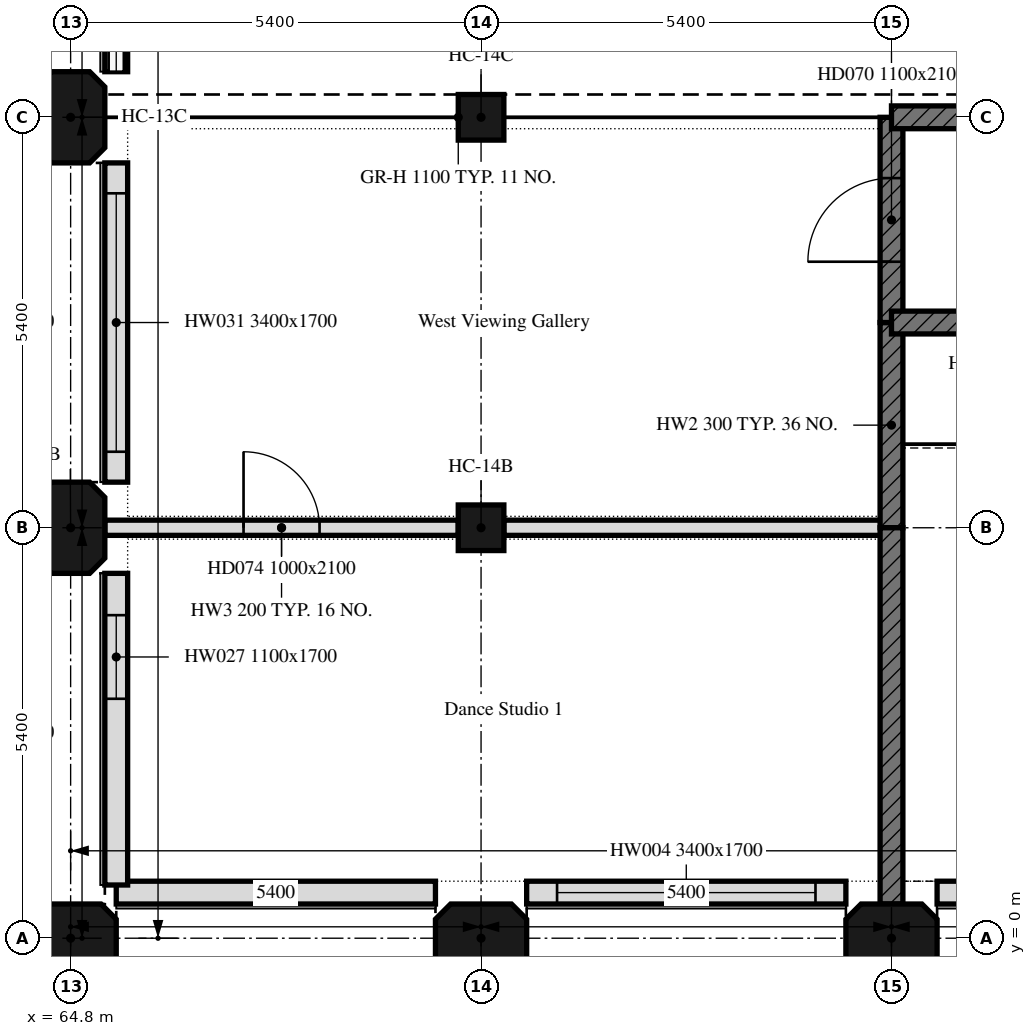
"""IFC4 building model, lengths in metres.
Left out: names, types, materials, properties, quantities, classifications, styles, units other than length and angle.
Written with IfcOpenShell. Run it as: python <this file> out.ifc"""

import sys

from ifc_helpers import new_model, si_unit, direction, frame, frame_2d, origin, origin_2d, place, context, subcontext, project, spatial, polyline, rectangle, outline, extrude, element, fill, save


model = new_model("IFC4")
c1 = context("Model", 3, precision=1e-05, world=origin(), true_north=direction((0.0, 1.0)))
c2 = subcontext(c1, "Body", "Model", "MODEL_VIEW")
j1 = project(units=[si_unit("LENGTHUNIT", "METRE"), si_unit("PLANEANGLEUNIT", "RADIAN")], contexts=[c1])
p1 = place(None, origin())
s1 = spatial("IfcSite", under=j1, at=p1, CompositionType="ELEMENT")
p2 = place(p1, origin())
s2 = spatial("IfcBuilding", under=s1, at=p2, CompositionType="ELEMENT")
p3 = place(p2, frame((0.0, 0.0, 19.8)))
s3 = spatial("IfcBuildingStorey", under=s2, at=p3, CompositionType="ELEMENT", Elevation=19.8)
p4 = place(p3, frame((64.8, 0.0, 0.0), z_axis=(0.0, 0.0, 1.0), x_axis=(1.0, 0.0, 0.0)))
e1 = element("IfcColumn", 1, at=p4, inside=s3, PredefinedType="COLUMN", context=c2, shape_type="SweptSolid", body=[
    extrude(outline(polyline([(-0.4, -0.45), (0.4, -0.45), (0.6, -0.25), (0.6, 0.25), (0.4, 0.45), (-0.4, 0.45), (-0.6, 0.25), (-0.6, -0.25), (-0.4, -0.45)])), origin(), (0.0, 0.0, 1.0), 3.802),
])
for number, where, z_axis, x_axis in (
    (2, (64.8, 5.4, 0.0), (0.0, 0.0, 1.0), (0.0, 1.0, 0.0)),
    (3, (64.8, 10.8, 0.0), (0.0, 0.0, 1.0), (0.0, 1.0, 0.0)),
):
    element("IfcColumn", number, at=place(p3, frame(where, z_axis=z_axis, x_axis=x_axis)), inside=s3, PredefinedType="COLUMN", context=c2, shape_type="SweptSolid", body=[
        extrude(outline(polyline([(-0.4, -0.45), (0.4, -0.45), (0.6, -0.25), (0.6, 0.25), (0.4, 0.45), (-0.4, 0.45), (-0.6, 0.25), (-0.6, -0.25), (-0.4, -0.45)])), origin(), (0.0, 0.0, 1.0), 4.8),
    ])
p5 = place(p3, frame((70.2, 0.0, 0.0), z_axis=(0.0, 0.0, 1.0), x_axis=(1.0, 0.0, 0.0)))
e4 = element("IfcColumn", 4, at=p5, inside=s3, PredefinedType="COLUMN", context=c2, shape_type="SweptSolid", body=[
    extrude(outline(polyline([(-0.4, -0.45), (0.4, -0.45), (0.6, -0.25), (0.6, 0.25), (0.4, 0.45), (-0.4, 0.45), (-0.6, 0.25), (-0.6, -0.25), (-0.4, -0.45)])), origin(), (0.0, 0.0, 1.0), 3.802),
])
for number, where, z_axis, x_axis in (
    (5, (70.2, 5.4, 0.0), (0.0, 0.0, 1.0), (1.0, 0.0, 0.0)),
    (6, (70.2, 10.8, 0.0), (0.0, 0.0, 1.0), (1.0, 0.0, 0.0)),
):
    element("IfcColumn", number, at=place(p3, frame(where, z_axis=z_axis, x_axis=x_axis)), inside=s3, PredefinedType="COLUMN", context=c2, shape_type="SweptSolid", body=[
        extrude(rectangle(XDim=0.6, YDim=0.6, at=origin_2d()), origin(), (0.0, 0.0, 1.0), 4.8),
    ])
p6 = place(p3, frame((75.6, 0.0, 0.0), z_axis=(0.0, 0.0, 1.0), x_axis=(1.0, 0.0, 0.0)))
e7 = element("IfcColumn", 7, at=p6, inside=s3, PredefinedType="COLUMN", context=c2, shape_type="SweptSolid", body=[
    extrude(outline(polyline([(-0.4, -0.45), (0.4, -0.45), (0.6, -0.25), (0.6, 0.25), (0.4, 0.45), (-0.4, 0.45), (-0.6, 0.25), (-0.6, -0.25), (-0.4, -0.45)])), origin(), (0.0, 0.0, 1.0), 3.802),
])
p7 = place(p3, frame((65.4, 0.6, 0.0), z_axis=(0.0, 0.0, 1.0), x_axis=(1.0, 0.0, 0.0)))
e8 = element("IfcWall", 8, at=p7, inside=s3, PredefinedType="SOLIDWALL", context=c2, shape_type="SweptSolid", body=[
    extrude(outline(polyline([(0.0, 0.0), (4.2, 0.0), (4.2, 5.365), (0.0, 5.365), (0.0, 0.0)])), frame((0.0, 0.15, 0.0), z_axis=(0.0, -1.0, 0.0), x_axis=(1.0, 0.0, 0.0)), (0.0, 0.0, 1.0), 0.3),
])
p8 = place(p3, frame((70.8, 0.6, 0.0), z_axis=(0.0, 0.0, 1.0), x_axis=(1.0, 0.0, 0.0)))
e9 = element("IfcWall", 9, at=p8, inside=s3, PredefinedType="SOLIDWALL", context=c2, shape_type="SweptSolid", body=[
    extrude(outline(polyline([(0.0, 0.0), (4.2, 0.0), (4.2, 5.365), (0.0, 5.365), (0.0, 0.0)])), frame((0.0, 0.15, 0.0), z_axis=(0.0, -1.0, 0.0), x_axis=(1.0, 0.0, 0.0)), (0.0, 0.0, 1.0), 0.3),
])
p9 = place(p8, frame((0.4, 0.0, 0.9)))
e10 = element("IfcOpeningElement", 10, at=p9, cuts=e9, PredefinedType="OPENING", context=c2, shape_type="SweptSolid", body=[
    extrude(rectangle(XDim=3.4, YDim=1.7, at=frame_2d((1.7, 0.85))), frame((0.0, 0.15, 0.0), z_axis=(0.0, -1.0, 0.0), x_axis=(1.0, 0.0, 0.0)), (0.0, 0.0, 1.0), 0.3),
])
p10 = place(p3, frame((76.2, 0.6, 0.0), z_axis=(0.0, 0.0, 1.0), x_axis=(1.0, 0.0, 0.0)))
e11 = element("IfcWall", 11, at=p10, inside=s3, PredefinedType="SOLIDWALL", context=c2, shape_type="SweptSolid", body=[
    extrude(outline(polyline([(0.0, 0.0), (4.2, 0.0), (4.2, 5.365), (0.0, 5.365), (0.0, 0.0)])), frame((0.0, 0.15, 0.0), z_axis=(0.0, -1.0, 0.0), x_axis=(1.0, 0.0, 0.0)), (0.0, 0.0, 1.0), 0.3),
])
p11 = place(p3, frame((65.4, 0.7, 0.0), z_axis=(0.0, 0.0, 1.0), x_axis=(0.0, 1.0, 0.0)))
e12 = element("IfcWall", 12, at=p11, inside=s3, PredefinedType="SOLIDWALL", context=c2, shape_type="SweptSolid", body=[
    extrude(outline(polyline([(0.0, 0.0), (4.1, 0.0), (4.1, 6.271), (0.0, 5.172), (0.0, 0.0)])), frame((0.0, 0.15, 0.0), z_axis=(0.0, -1.0, 0.0), x_axis=(1.0, 0.0, 0.0)), (0.0, 0.0, 1.0), 0.3),
])
p12 = place(p11, frame((2.45, 0.0, 0.9)))
e13 = element("IfcOpeningElement", 13, at=p12, cuts=e12, PredefinedType="OPENING", context=c2, shape_type="SweptSolid", body=[
    extrude(rectangle(XDim=1.1, YDim=1.7, at=frame_2d((0.55, 0.85))), frame((0.0, 0.15, 0.0), z_axis=(0.0, -1.0, 0.0), x_axis=(1.0, 0.0, 0.0)), (0.0, 0.0, 1.0), 0.3),
])
p13 = place(p3, frame((65.4, 6.0, 0.0), z_axis=(0.0, 0.0, 1.0), x_axis=(0.0, 1.0, 0.0)))
e14 = element("IfcWall", 14, at=p13, inside=s3, PredefinedType="SOLIDWALL", context=c2, shape_type="SweptSolid", body=[
    extrude(outline(polyline([(0.0, 0.0), (4.2, 0.0), (4.2, 7.718), (0.0, 6.592), (0.0, 0.0)])), frame((0.0, 0.15, 0.0), z_axis=(0.0, -1.0, 0.0), x_axis=(1.0, 0.0, 0.0)), (0.0, 0.0, 1.0), 0.3),
])
p14 = place(p13, frame((0.4, 0.0, 0.9)))
e15 = element("IfcOpeningElement", 15, at=p14, cuts=e14, PredefinedType="OPENING", context=c2, shape_type="SweptSolid", body=[
    extrude(rectangle(XDim=3.4, YDim=1.7, at=frame_2d((1.7, 0.85))), frame((0.0, 0.15, 0.0), z_axis=(0.0, -1.0, 0.0), x_axis=(1.0, 0.0, 0.0)), (0.0, 0.0, 1.0), 0.3),
])
p15 = place(p3, frame((65.4, 11.4, 0.0), z_axis=(0.0, 0.0, 1.0), x_axis=(0.0, 1.0, 0.0)))
e16 = element("IfcWall", 16, at=p15, inside=s3, PredefinedType="SOLIDWALL", context=c2, shape_type="SweptSolid", body=[
    extrude(rectangle(XDim=4.2, YDim=0.3, at=frame_2d((2.1, 0.0))), origin(), (0.0, 0.0, 1.0), 3.2),
])
p16 = place(p3, frame((65.25, 5.4, 0.0), z_axis=(0.0, 0.0, 1.0), x_axis=(1.0, 0.0, 0.0)))
e17 = element("IfcWall", 17, at=p16, inside=s3, PredefinedType="PARTITIONING", context=c2, shape_type="SweptSolid", body=[
    extrude(rectangle(XDim=4.65, YDim=0.2, at=frame_2d((2.325, 0.0))), origin(), (0.0, 0.0, 1.0), 5.317),
])
p17 = place(p16, frame((1.825, 0.0, 0.0)))
e18 = element("IfcOpeningElement", 18, at=p17, cuts=e17, PredefinedType="OPENING", context=c2, shape_type="SweptSolid", body=[
    extrude(rectangle(XDim=1.0, YDim=2.1, at=frame_2d((0.5, 1.05))), frame((0.0, 0.1, 0.0), z_axis=(0.0, -1.0, 0.0), x_axis=(1.0, 0.0, 0.0)), (0.0, 0.0, 1.0), 0.2),
])
p18 = place(p3, frame((70.5, 5.4, 0.0), z_axis=(0.0, 0.0, 1.0), x_axis=(1.0, 0.0, 0.0)))
e19 = element("IfcWall", 19, at=p18, inside=s3, PredefinedType="PARTITIONING", context=c2, shape_type="SweptSolid", body=[
    extrude(rectangle(XDim=5.1, YDim=0.2, at=frame_2d((2.55, 0.0))), origin(), (0.0, 0.0, 1.0), 5.317),
])
p19 = place(p3, frame((75.6, 5.4, 0.0), z_axis=(0.0, 0.0, 1.0), x_axis=(0.0, 1.0, 0.0)))
e20 = element("IfcWall", 20, at=p19, inside=s3, PredefinedType="SHEAR", context=c2, shape_type="SweptSolid", body=[
    extrude(outline(polyline([(0.0, 0.0), (2.7, 0.0), (2.7, 6.067), (0.0, 5.344), (0.0, 0.0)])), frame((0.0, 0.15, 0.0), z_axis=(0.0, -1.0, 0.0), x_axis=(1.0, 0.0, 0.0)), (0.0, 0.0, 1.0), 0.3),
])
p20 = place(p3, frame((75.6, 8.1, 0.0), z_axis=(0.0, 0.0, 1.0), x_axis=(0.0, 1.0, 0.0)))
e21 = element("IfcWall", 21, at=p20, inside=s3, PredefinedType="SHEAR", context=c2, shape_type="SweptSolid", body=[
    extrude(outline(polyline([(0.0, 0.0), (2.7, 0.0), (2.7, 6.791), (0.0, 6.067), (0.0, 0.0)])), frame((0.0, 0.15, 0.0), z_axis=(0.0, -1.0, 0.0), x_axis=(1.0, 0.0, 0.0)), (0.0, 0.0, 1.0), 0.3),
])
p21 = place(p20, frame((0.8, 0.0, 0.0)))
e22 = element("IfcOpeningElement", 22, at=p21, cuts=e21, PredefinedType="OPENING", context=c2, shape_type="SweptSolid", body=[
    extrude(rectangle(XDim=1.1, YDim=2.1, at=frame_2d((0.55, 1.05))), frame((0.0, 0.15, 0.0), z_axis=(0.0, -1.0, 0.0), x_axis=(1.0, 0.0, 0.0)), (0.0, 0.0, 1.0), 0.3),
])
p22 = place(p3, frame((75.6, 0.45, 0.0), z_axis=(0.0, 0.0, 1.0), x_axis=(0.0, 1.0, 0.0)))
e23 = element("IfcWall", 23, at=p22, inside=s3, PredefinedType="SHEAR", context=c2, shape_type="SweptSolid", body=[
    extrude(outline(polyline([(0.0, 0.0), (4.95, 0.0), (4.95, 5.344), (0.0, 4.018), (0.0, 0.0)])), frame((0.0, 0.15, 0.0), z_axis=(0.0, -1.0, 0.0), x_axis=(1.0, 0.0, 0.0)), (0.0, 0.0, 1.0), 0.3),
])
p23 = place(p3, frame((75.6, 8.1, 0.0), z_axis=(0.0, 0.0, 1.0), x_axis=(1.0, 0.0, 0.0)))
e24 = element("IfcWall", 24, at=p23, inside=s3, PredefinedType="SHEAR", context=c2, shape_type="SweptSolid", body=[
    extrude(rectangle(XDim=3.45, YDim=0.3, at=frame_2d((1.725, 0.0))), origin(), (0.0, 0.0, 1.0), 6.027),
])
p24 = place(p23, frame((1.175, 0.0, 0.0)))
e25 = element("IfcOpeningElement", 25, at=p24, cuts=e24, PredefinedType="OPENING", context=c2, shape_type="SweptSolid", body=[
    extrude(rectangle(XDim=1.1, YDim=2.1, at=frame_2d((0.55, 1.05))), frame((0.0, 0.15, 0.0), z_axis=(0.0, -1.0, 0.0), x_axis=(1.0, 0.0, 0.0)), (0.0, 0.0, 1.0), 0.3),
])
p25 = place(p3, frame((75.6, 10.8, 0.0), z_axis=(0.0, 0.0, 1.0), x_axis=(1.0, 0.0, 0.0)))
e26 = element("IfcWall", 26, at=p25, inside=s3, PredefinedType="SHEAR", context=c2, shape_type="SweptSolid", body=[
    extrude(rectangle(XDim=5.4, YDim=0.3, at=frame_2d((2.7, 0.0))), origin(), (0.0, 0.0, 1.0), 6.751),
])
p26 = place(p9, origin())
e27 = element("IfcWindow", 27, at=p26, inside=s3, PartitioningType="SINGLE_PANEL", PredefinedType="WINDOW", context=c2, shape_type="SweptSolid", body=[
    extrude(rectangle(XDim=3.4, YDim=1.7, at=frame_2d((1.7, 0.85))), frame((0.0, 0.03, 0.0), z_axis=(0.0, -1.0, 0.0), x_axis=(1.0, 0.0, 0.0)), (0.0, 0.0, 1.0), 0.06),
])
fill(e10, e27)
p27 = place(p12, origin())
e28 = element("IfcWindow", 28, at=p27, inside=s3, PartitioningType="SINGLE_PANEL", PredefinedType="WINDOW", context=c2, shape_type="SweptSolid", body=[
    extrude(rectangle(XDim=1.1, YDim=1.7, at=frame_2d((0.55, 0.85))), frame((0.0, 0.03, 0.0), z_axis=(0.0, -1.0, 0.0), x_axis=(1.0, 0.0, 0.0)), (0.0, 0.0, 1.0), 0.06),
])
fill(e13, e28)
p28 = place(p14, origin())
e29 = element("IfcWindow", 29, at=p28, inside=s3, PartitioningType="SINGLE_PANEL", PredefinedType="WINDOW", context=c2, shape_type="SweptSolid", body=[
    extrude(rectangle(XDim=3.4, YDim=1.7, at=frame_2d((1.7, 0.85))), frame((0.0, 0.03, 0.0), z_axis=(0.0, -1.0, 0.0), x_axis=(1.0, 0.0, 0.0)), (0.0, 0.0, 1.0), 0.06),
])
fill(e15, e29)
p29 = place(p21, origin())
e30 = element("IfcDoor", 30, at=p29, inside=s3, OperationType="SINGLE_SWING_LEFT", PredefinedType="DOOR", context=c2, shape_type="SweptSolid", body=[
    extrude(rectangle(XDim=1.1, YDim=2.1, at=frame_2d((0.55, 1.05))), frame((0.0, 0.025, 0.0), z_axis=(0.0, -1.0, 0.0), x_axis=(1.0, 0.0, 0.0)), (0.0, 0.0, 1.0), 0.05),
])
fill(e22, e30)
p30 = place(p17, origin())
e31 = element("IfcDoor", 31, at=p30, inside=s3, OperationType="SINGLE_SWING_LEFT", PredefinedType="DOOR", context=c2, shape_type="SweptSolid", body=[
    extrude(rectangle(XDim=1.0, YDim=2.1, at=frame_2d((0.5, 1.05))), frame((0.0, 0.025, 0.0), z_axis=(0.0, -1.0, 0.0), x_axis=(1.0, 0.0, 0.0)), (0.0, 0.0, 1.0), 0.05),
])
fill(e18, e31)
save(model, sys.argv[1])
